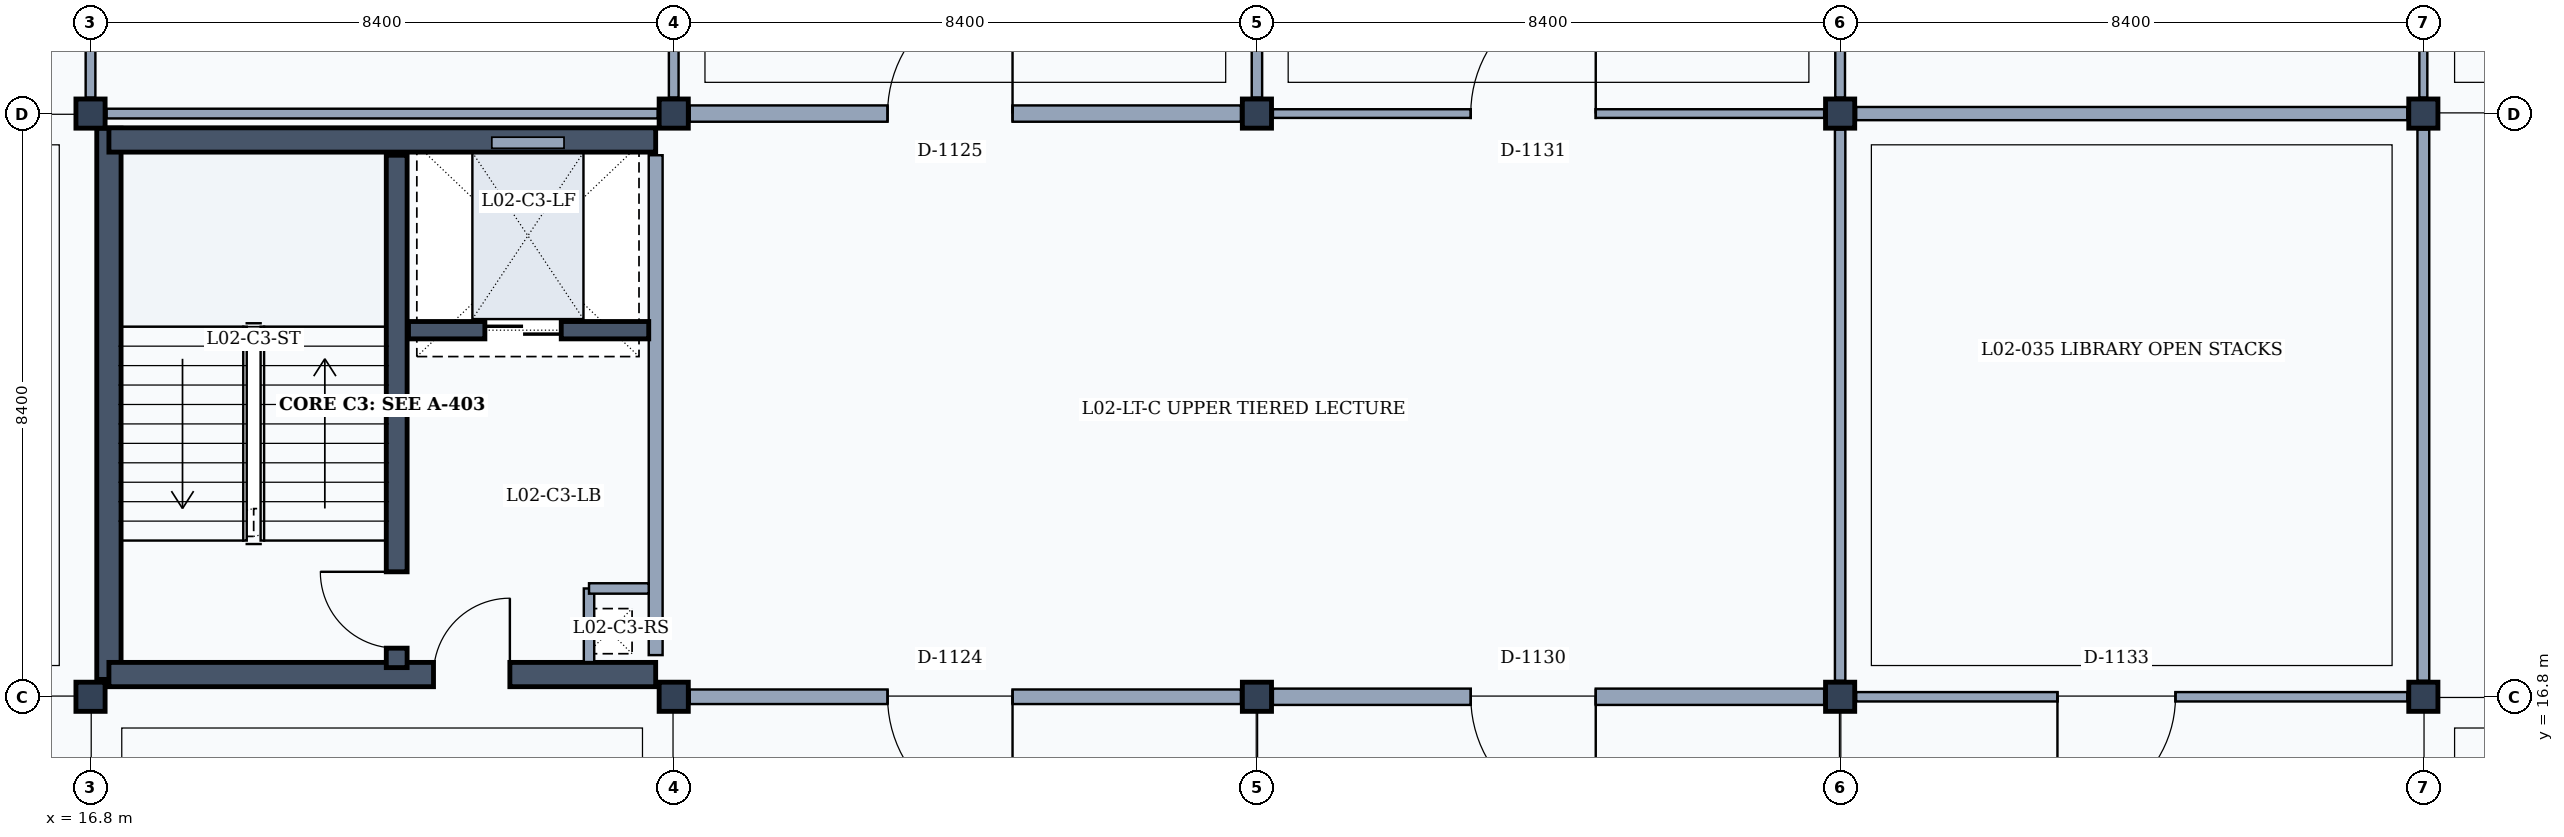
"""IFC4 building model, lengths in metres.
Left out: names, types, materials, properties, quantities, classifications, styles, units other than length and angle.
Written with IfcOpenShell. Run it as: python <this file> out.ifc"""

import sys

from ifc_helpers import new_model, si_unit, direction, frame, frame_2d, origin, origin_2d, place, context, subcontext, project, spatial, rectangle, extrude, element, fill, save


model = new_model("IFC4")
c1 = context("Model", 3, precision=1e-05, world=origin(), true_north=direction((0.0, 1.0)))
c2 = subcontext(c1, "Body", "Model", "MODEL_VIEW")
j1 = project(units=[si_unit("LENGTHUNIT", "METRE"), si_unit("PLANEANGLEUNIT", "RADIAN")], contexts=[c1])
p1 = place(None, origin())
s1 = spatial("IfcSite", under=j1, at=p1, CompositionType="ELEMENT")
p2 = place(p1, origin())
s2 = spatial("IfcBuilding", under=s1, at=p2, CompositionType="ELEMENT")
p3 = place(p2, frame((0.0, 0.0, 9.6)))
s3 = spatial("IfcBuildingStorey", under=s2, at=p3, CompositionType="ELEMENT", Elevation=9.6)
for number, where, z_axis, x_axis in (
    (1, (16.8, 16.8, 0.0), (0.0, 0.0, 1.0), (1.0, 0.0, 0.0)),
    (2, (16.8, 25.2, 0.0), (0.0, 0.0, 1.0), (1.0, 0.0, 0.0)),
    (3, (25.2, 16.8, 0.0), (0.0, 0.0, 1.0), (1.0, 0.0, 0.0)),
    (4, (25.2, 25.2, 0.0), (0.0, 0.0, 1.0), (1.0, 0.0, 0.0)),
    (5, (33.6, 16.8, 0.0), (0.0, 0.0, 1.0), (1.0, 0.0, 0.0)),
    (6, (33.6, 25.2, 0.0), (0.0, 0.0, 1.0), (1.0, 0.0, 0.0)),
    (7, (42.0, 16.8, 0.0), (0.0, 0.0, 1.0), (1.0, 0.0, 0.0)),
    (8, (42.0, 25.2, 0.0), (0.0, 0.0, 1.0), (1.0, 0.0, 0.0)),
    (9, (50.4, 16.8, 0.0), (0.0, 0.0, 1.0), (1.0, 0.0, 0.0)),
    (10, (50.4, 25.2, 0.0), (0.0, 0.0, 1.0), (1.0, 0.0, 0.0)),
):
    element("IfcColumn", number, at=place(p3, frame(where, z_axis=z_axis, x_axis=x_axis)), inside=s3, PredefinedType="COLUMN", context=c2, shape_type="SweptSolid", body=[
        extrude(rectangle(XDim=0.42, YDim=0.42, at=origin_2d()), origin(), (0.0, 0.0, 1.0), 4.2),
    ])
p4 = place(p3, frame((17.065, 17.05, 0.0), z_axis=(0.0, 0.0, 1.0), x_axis=(0.0, 1.0, 0.0)))
e11 = element("IfcWall", 11, at=p4, inside=s3, PredefinedType="SHEAR", context=c2, shape_type="SweptSolid", body=[
    extrude(rectangle(XDim=7.94, YDim=0.35, at=frame_2d((3.97, 0.0))), origin(), (0.0, 0.0, 1.0), 3.93),
])
p5 = place(p3, frame((17.065, 24.82, 0.0), z_axis=(0.0, 0.0, 1.0), x_axis=(1.0, 0.0, 0.0)))
e12 = element("IfcWall", 12, at=p5, inside=s3, PredefinedType="SHEAR", context=c2, shape_type="SweptSolid", body=[
    extrude(rectangle(XDim=7.875, YDim=0.35, at=frame_2d((3.938, 0.0))), origin(), (0.0, 0.0, 1.0), 3.93),
])
p6 = place(p3, frame((24.94, 24.6, 0.0), z_axis=(0.0, 0.0, 1.0), x_axis=(0.0, -1.0, 0.0)))
e13 = element("IfcWall", 13, at=p6, inside=s3, PredefinedType="PARTITIONING", context=c2, shape_type="SweptSolid", body=[
    extrude(rectangle(XDim=7.2, YDim=0.2, at=frame_2d((3.6, 0.0))), origin(), (0.0, 0.0, 1.0), 3.32),
])
p7 = place(p3, frame((24.94, 17.12, 0.0), z_axis=(0.0, 0.0, 1.0), x_axis=(-1.0, 0.0, 0.0)))
e14 = element("IfcWall", 14, at=p7, inside=s3, PredefinedType="SHEAR", context=c2, shape_type="SweptSolid", body=[
    extrude(rectangle(XDim=7.875, YDim=0.35, at=frame_2d((3.938, 0.0))), origin(), (0.0, 0.0, 1.0), 3.93),
])
p8 = place(p7, frame((2.1, 0.0, 0.0)))
e15 = element("IfcOpeningElement", 15, at=p8, cuts=e14, PredefinedType="OPENING", context=c2, shape_type="SweptSolid", body=[
    extrude(rectangle(XDim=1.1, YDim=2.15, at=frame_2d((0.55, 1.075))), frame((0.0, 0.185, 0.0), z_axis=(0.0, -1.0, 0.0), x_axis=(1.0, 0.0, 0.0)), (0.0, 0.0, 1.0), 0.37),
])
p9 = place(p3, frame((21.21, 17.22, 0.0), z_axis=(0.0, 0.0, 1.0), x_axis=(0.0, 1.0, 0.0)))
e16 = element("IfcWall", 16, at=p9, inside=s3, PredefinedType="SHEAR", context=c2, shape_type="SweptSolid", body=[
    extrude(rectangle(XDim=7.38, YDim=0.3, at=frame_2d((3.69, 0.0))), origin(), (0.0, 0.0, 1.0), 3.93),
])
p10 = place(p9, frame((0.28, 0.0, 0.0)))
e17 = element("IfcOpeningElement", 17, at=p10, cuts=e16, PredefinedType="OPENING", context=c2, shape_type="SweptSolid", body=[
    extrude(rectangle(XDim=1.1, YDim=2.15, at=frame_2d((0.55, 1.075))), frame((0.0, 0.16, 0.0), z_axis=(0.0, -1.0, 0.0), x_axis=(1.0, 0.0, 0.0)), (0.0, 0.0, 1.0), 0.32),
])
p11 = place(p3, frame((23.98, 18.36, 0.0), z_axis=(0.0, 0.0, 1.0), x_axis=(0.0, -1.0, 0.0)))
e18 = element("IfcWall", 18, at=p11, inside=s3, PredefinedType="PARTITIONING", context=c2, shape_type="SweptSolid", body=[
    extrude(rectangle(XDim=1.06, YDim=0.15, at=frame_2d((0.53, 0.0))), origin(), (0.0, 0.0, 1.0), 3.32),
])
p12 = place(p3, frame((23.98, 18.36, 0.0), z_axis=(0.0, 0.0, 1.0), x_axis=(1.0, 0.0, 0.0)))
e19 = element("IfcWall", 19, at=p12, inside=s3, PredefinedType="PARTITIONING", context=c2, shape_type="SweptSolid", body=[
    extrude(rectangle(XDim=0.86, YDim=0.15, at=frame_2d((0.43, 0.0))), origin(), (0.0, 0.0, 1.0), 3.32),
])
p13 = place(p3, frame((21.38, 22.08, 0.0), z_axis=(0.0, 0.0, 1.0), x_axis=(1.0, 0.0, 0.0)))
e20 = element("IfcWall", 20, at=p13, inside=s3, PredefinedType="SHEAR", context=c2, shape_type="SweptSolid", body=[
    extrude(rectangle(XDim=3.46, YDim=0.25, at=frame_2d((1.73, 0.0))), origin(), (0.0, 0.0, 1.0), 3.93),
])
p14 = place(p13, frame((1.1, 0.0, 0.0)))
e21 = element("IfcOpeningElement", 21, at=p14, cuts=e20, PredefinedType="OPENING", context=c2, shape_type="SweptSolid", body=[
    extrude(rectangle(XDim=1.1, YDim=2.15, at=frame_2d((0.55, 1.075))), frame((0.0, 0.135, 0.0), z_axis=(0.0, -1.0, 0.0), x_axis=(1.0, 0.0, 0.0)), (0.0, 0.0, 1.0), 0.27),
])
p15 = place(p3, frame((16.8, 25.43, 0.0), z_axis=(0.0, 0.0, 1.0), x_axis=(0.0, 1.0, 0.0)))
e22 = element("IfcWall", 22, at=p15, inside=s3, PredefinedType="PARTITIONING", context=c2, shape_type="SweptSolid", body=[
    extrude(rectangle(XDim=7.94, YDim=0.14, at=frame_2d((3.97, 0.0))), origin(), (0.0, 0.0, 1.0), 3.32),
])
p16 = place(p15, frame((3.275, 0.0, 0.0)))
e23 = element("IfcOpeningElement", 23, at=p16, cuts=e22, PredefinedType="OPENING", context=c2, shape_type="SweptSolid", body=[
    extrude(rectangle(XDim=0.95, YDim=2.15, at=frame_2d((0.475, 1.075))), frame((0.0, 0.08, 0.0), z_axis=(0.0, -1.0, 0.0), x_axis=(1.0, 0.0, 0.0)), (0.0, 0.0, 1.0), 0.16),
])
p17 = place(p3, frame((17.03, 25.2, 0.0), z_axis=(0.0, 0.0, 1.0), x_axis=(1.0, 0.0, 0.0)))
e24 = element("IfcWall", 24, at=p17, inside=s3, PredefinedType="PARTITIONING", context=c2, shape_type="SweptSolid", body=[
    extrude(rectangle(XDim=7.94, YDim=0.14, at=frame_2d((3.97, 0.0))), origin(), (0.0, 0.0, 1.0), 3.32),
])
p18 = place(p3, frame((25.2, 25.43, 0.0), z_axis=(0.0, 0.0, 1.0), x_axis=(0.0, 1.0, 0.0)))
e25 = element("IfcWall", 25, at=p18, inside=s3, PredefinedType="PARTITIONING", context=c2, shape_type="SweptSolid", body=[
    extrude(rectangle(XDim=7.94, YDim=0.14, at=frame_2d((3.97, 0.0))), origin(), (0.0, 0.0, 1.0), 3.32),
])
p19 = place(p3, frame((25.43, 16.8, 0.0), z_axis=(0.0, 0.0, 1.0), x_axis=(1.0, 0.0, 0.0)))
e26 = element("IfcWall", 26, at=p19, inside=s3, PredefinedType="PARTITIONING", context=c2, shape_type="SweptSolid", body=[
    extrude(rectangle(XDim=7.94, YDim=0.21, at=frame_2d((3.97, 0.0))), origin(), (0.0, 0.0, 1.0), 3.32),
])
p20 = place(p19, frame((2.85, 0.0, 0.0)))
e27 = element("IfcOpeningElement", 27, at=p20, cuts=e26, PredefinedType="OPENING", context=c2, shape_type="SweptSolid", body=[
    extrude(rectangle(XDim=1.8, YDim=2.3, at=frame_2d((0.9, 1.15))), frame((0.0, 0.115, 0.0), z_axis=(0.0, -1.0, 0.0), x_axis=(1.0, 0.0, 0.0)), (0.0, 0.0, 1.0), 0.23),
])
p21 = place(p3, frame((25.43, 25.2, 0.0), z_axis=(0.0, 0.0, 1.0), x_axis=(1.0, 0.0, 0.0)))
e28 = element("IfcWall", 28, at=p21, inside=s3, PredefinedType="PARTITIONING", context=c2, shape_type="SweptSolid", body=[
    extrude(rectangle(XDim=7.94, YDim=0.235, at=frame_2d((3.97, 0.0))), origin(), (0.0, 0.0, 1.0), 3.32),
])
p22 = place(p21, frame((2.85, 0.0, 0.0)))
e29 = element("IfcOpeningElement", 29, at=p22, cuts=e28, PredefinedType="OPENING", context=c2, shape_type="SweptSolid", body=[
    extrude(rectangle(XDim=1.8, YDim=2.3, at=frame_2d((0.9, 1.15))), frame((0.0, 0.127, 0.0), z_axis=(0.0, -1.0, 0.0), x_axis=(1.0, 0.0, 0.0)), (0.0, 0.0, 1.0), 0.255),
])
p23 = place(p3, frame((33.6, 25.43, 0.0), z_axis=(0.0, 0.0, 1.0), x_axis=(0.0, 1.0, 0.0)))
e30 = element("IfcWall", 30, at=p23, inside=s3, PredefinedType="PARTITIONING", context=c2, shape_type="SweptSolid", body=[
    extrude(rectangle(XDim=7.94, YDim=0.15, at=frame_2d((3.97, 0.0))), origin(), (0.0, 0.0, 1.0), 3.32),
])
p24 = place(p3, frame((33.83, 16.8, 0.0), z_axis=(0.0, 0.0, 1.0), x_axis=(1.0, 0.0, 0.0)))
e31 = element("IfcWall", 31, at=p24, inside=s3, PredefinedType="PARTITIONING", context=c2, shape_type="SweptSolid", body=[
    extrude(rectangle(XDim=7.94, YDim=0.235, at=frame_2d((3.97, 0.0))), origin(), (0.0, 0.0, 1.0), 3.32),
])
p25 = place(p24, frame((2.85, 0.0, 0.0)))
e32 = element("IfcOpeningElement", 32, at=p25, cuts=e31, PredefinedType="OPENING", context=c2, shape_type="SweptSolid", body=[
    extrude(rectangle(XDim=1.8, YDim=2.3, at=frame_2d((0.9, 1.15))), frame((0.0, 0.127, 0.0), z_axis=(0.0, -1.0, 0.0), x_axis=(1.0, 0.0, 0.0)), (0.0, 0.0, 1.0), 0.255),
])
p26 = place(p3, frame((42.0, 17.03, 0.0), z_axis=(0.0, 0.0, 1.0), x_axis=(0.0, 1.0, 0.0)))
e33 = element("IfcWall", 33, at=p26, inside=s3, PredefinedType="PARTITIONING", context=c2, shape_type="SweptSolid", body=[
    extrude(rectangle(XDim=7.94, YDim=0.15, at=frame_2d((3.97, 0.0))), origin(), (0.0, 0.0, 1.0), 3.32),
])
p27 = place(p3, frame((33.83, 25.2, 0.0), z_axis=(0.0, 0.0, 1.0), x_axis=(1.0, 0.0, 0.0)))
e34 = element("IfcWall", 34, at=p27, inside=s3, PredefinedType="PARTITIONING", context=c2, shape_type="SweptSolid", body=[
    extrude(rectangle(XDim=7.94, YDim=0.125, at=frame_2d((3.97, 0.0))), origin(), (0.0, 0.0, 1.0), 3.32),
])
p28 = place(p27, frame((2.85, 0.0, 0.0)))
e35 = element("IfcOpeningElement", 35, at=p28, cuts=e34, PredefinedType="OPENING", context=c2, shape_type="SweptSolid", body=[
    extrude(rectangle(XDim=1.8, YDim=2.3, at=frame_2d((0.9, 1.15))), frame((0.0, 0.073, 0.0), z_axis=(0.0, -1.0, 0.0), x_axis=(1.0, 0.0, 0.0)), (0.0, 0.0, 1.0), 0.145),
])
p29 = place(p3, frame((42.0, 25.43, 0.0), z_axis=(0.0, 0.0, 1.0), x_axis=(0.0, 1.0, 0.0)))
e36 = element("IfcWall", 36, at=p29, inside=s3, PredefinedType="PARTITIONING", context=c2, shape_type="SweptSolid", body=[
    extrude(rectangle(XDim=7.94, YDim=0.14, at=frame_2d((3.97, 0.0))), origin(), (0.0, 0.0, 1.0), 3.32),
])
p30 = place(p3, frame((42.23, 16.8, 0.0), z_axis=(0.0, 0.0, 1.0), x_axis=(1.0, 0.0, 0.0)))
e37 = element("IfcWall", 37, at=p30, inside=s3, PredefinedType="PARTITIONING", context=c2, shape_type="SweptSolid", body=[
    extrude(rectangle(XDim=7.94, YDim=0.135, at=frame_2d((3.97, 0.0))), origin(), (0.0, 0.0, 1.0), 3.32),
])
p31 = place(p30, frame((2.9, 0.0, 0.0)))
e38 = element("IfcOpeningElement", 38, at=p31, cuts=e37, PredefinedType="OPENING", context=c2, shape_type="SweptSolid", body=[
    extrude(rectangle(XDim=1.7, YDim=2.3, at=frame_2d((0.85, 1.15))), frame((0.0, 0.077, 0.0), z_axis=(0.0, -1.0, 0.0), x_axis=(1.0, 0.0, 0.0)), (0.0, 0.0, 1.0), 0.155),
])
p32 = place(p3, frame((50.4, 17.03, 0.0), z_axis=(0.0, 0.0, 1.0), x_axis=(0.0, 1.0, 0.0)))
e39 = element("IfcWall", 39, at=p32, inside=s3, PredefinedType="PARTITIONING", context=c2, shape_type="SweptSolid", body=[
    extrude(rectangle(XDim=7.94, YDim=0.17, at=frame_2d((3.97, 0.0))), origin(), (0.0, 0.0, 1.0), 3.32),
])
p33 = place(p3, frame((42.23, 25.2, 0.0), z_axis=(0.0, 0.0, 1.0), x_axis=(1.0, 0.0, 0.0)))
e40 = element("IfcWall", 40, at=p33, inside=s3, PredefinedType="PARTITIONING", context=c2, shape_type="SweptSolid", body=[
    extrude(rectangle(XDim=7.94, YDim=0.19, at=frame_2d((3.97, 0.0))), origin(), (0.0, 0.0, 1.0), 3.32),
])
p34 = place(p3, frame((50.4, 25.43, 0.0), z_axis=(0.0, 0.0, 1.0), x_axis=(0.0, 1.0, 0.0)))
e41 = element("IfcWall", 41, at=p34, inside=s3, PredefinedType="PARTITIONING", context=c2, shape_type="SweptSolid", body=[
    extrude(rectangle(XDim=7.94, YDim=0.115, at=frame_2d((3.97, 0.0))), origin(), (0.0, 0.0, 1.0), 3.32),
])
p35 = place(p34, frame((2.8, 0.0, 0.0)))
e42 = element("IfcOpeningElement", 42, at=p35, cuts=e41, PredefinedType="OPENING", context=c2, shape_type="SweptSolid", body=[
    extrude(rectangle(XDim=1.9, YDim=2.4, at=frame_2d((0.95, 1.2))), frame((0.0, 0.067, 0.0), z_axis=(0.0, -1.0, 0.0), x_axis=(1.0, 0.0, 0.0)), (0.0, 0.0, 1.0), 0.135),
])
p36 = place(p8, frame((1.1, 0.0, 0.0), z_axis=(0.0, 0.0, 1.0), x_axis=(-1.0, 0.0, 0.0)))
e43 = element("IfcDoor", 43, at=p36, inside=s3, OperationType="SINGLE_SWING_RIGHT", PredefinedType="DOOR", context=c2, shape_type="SweptSolid", body=[
    extrude(rectangle(XDim=1.1, YDim=2.15, at=frame_2d((0.55, 1.075))), frame((0.0, 0.025, 0.0), z_axis=(0.0, -1.0, 0.0), x_axis=(1.0, 0.0, 0.0)), (0.0, 0.0, 1.0), 0.05),
])
fill(e15, e43)
p37 = place(p10, origin())
e44 = element("IfcDoor", 44, at=p37, inside=s3, OperationType="SINGLE_SWING_RIGHT", PredefinedType="DOOR", context=c2, shape_type="SweptSolid", body=[
    extrude(rectangle(XDim=1.1, YDim=2.15, at=frame_2d((0.55, 1.075))), frame((0.0, 0.025, 0.0), z_axis=(0.0, -1.0, 0.0), x_axis=(1.0, 0.0, 0.0)), (0.0, 0.0, 1.0), 0.05),
])
fill(e17, e44)
p38 = place(p14, origin())
e45 = element("IfcDoor", 45, at=p38, inside=s3, OperationType="DOUBLE_DOOR_SLIDING", PredefinedType="DOOR", context=c2, shape_type="SweptSolid", body=[
    extrude(rectangle(XDim=1.1, YDim=2.15, at=frame_2d((0.55, 1.075))), frame((0.0, 0.025, 0.0), z_axis=(0.0, -1.0, 0.0), x_axis=(1.0, 0.0, 0.0)), (0.0, 0.0, 1.0), 0.05),
])
fill(e21, e45)
p39 = place(p20, frame((1.8, 0.0, 0.0), z_axis=(0.0, 0.0, 1.0), x_axis=(-1.0, 0.0, 0.0)))
e46 = element("IfcDoor", 46, at=p39, inside=s3, OperationType="SINGLE_SWING_LEFT", PredefinedType="DOOR", context=c2, shape_type="SweptSolid", body=[
    extrude(rectangle(XDim=1.8, YDim=2.3, at=frame_2d((0.9, 1.15))), frame((0.0, 0.025, 0.0), z_axis=(0.0, -1.0, 0.0), x_axis=(1.0, 0.0, 0.0)), (0.0, 0.0, 1.0), 0.05),
])
fill(e27, e46)
p40 = place(p22, origin())
e47 = element("IfcDoor", 47, at=p40, inside=s3, OperationType="SINGLE_SWING_RIGHT", PredefinedType="DOOR", context=c2, shape_type="SweptSolid", body=[
    extrude(rectangle(XDim=1.8, YDim=2.3, at=frame_2d((0.9, 1.15))), frame((0.0, 0.025, 0.0), z_axis=(0.0, -1.0, 0.0), x_axis=(1.0, 0.0, 0.0)), (0.0, 0.0, 1.0), 0.05),
])
fill(e29, e47)
p41 = place(p25, frame((1.8, 0.0, 0.0), z_axis=(0.0, 0.0, 1.0), x_axis=(-1.0, 0.0, 0.0)))
e48 = element("IfcDoor", 48, at=p41, inside=s3, OperationType="SINGLE_SWING_LEFT", PredefinedType="DOOR", context=c2, shape_type="SweptSolid", body=[
    extrude(rectangle(XDim=1.8, YDim=2.3, at=frame_2d((0.9, 1.15))), frame((0.0, 0.025, 0.0), z_axis=(0.0, -1.0, 0.0), x_axis=(1.0, 0.0, 0.0)), (0.0, 0.0, 1.0), 0.05),
])
fill(e32, e48)
p42 = place(p28, origin())
e49 = element("IfcDoor", 49, at=p42, inside=s3, OperationType="SINGLE_SWING_RIGHT", PredefinedType="DOOR", context=c2, shape_type="SweptSolid", body=[
    extrude(rectangle(XDim=1.8, YDim=2.3, at=frame_2d((0.9, 1.15))), frame((0.0, 0.025, 0.0), z_axis=(0.0, -1.0, 0.0), x_axis=(1.0, 0.0, 0.0)), (0.0, 0.0, 1.0), 0.05),
])
fill(e35, e49)
p43 = place(p31, frame((1.7, 0.0, 0.0), z_axis=(0.0, 0.0, 1.0), x_axis=(-1.0, 0.0, 0.0)))
e50 = element("IfcDoor", 50, at=p43, inside=s3, OperationType="SINGLE_SWING_RIGHT", PredefinedType="DOOR", context=c2, shape_type="SweptSolid", body=[
    extrude(rectangle(XDim=1.7, YDim=2.3, at=frame_2d((0.85, 1.15))), frame((0.0, 0.025, 0.0), z_axis=(0.0, -1.0, 0.0), x_axis=(1.0, 0.0, 0.0)), (0.0, 0.0, 1.0), 0.05),
])
fill(e38, e50)
save(model, sys.argv[1])
